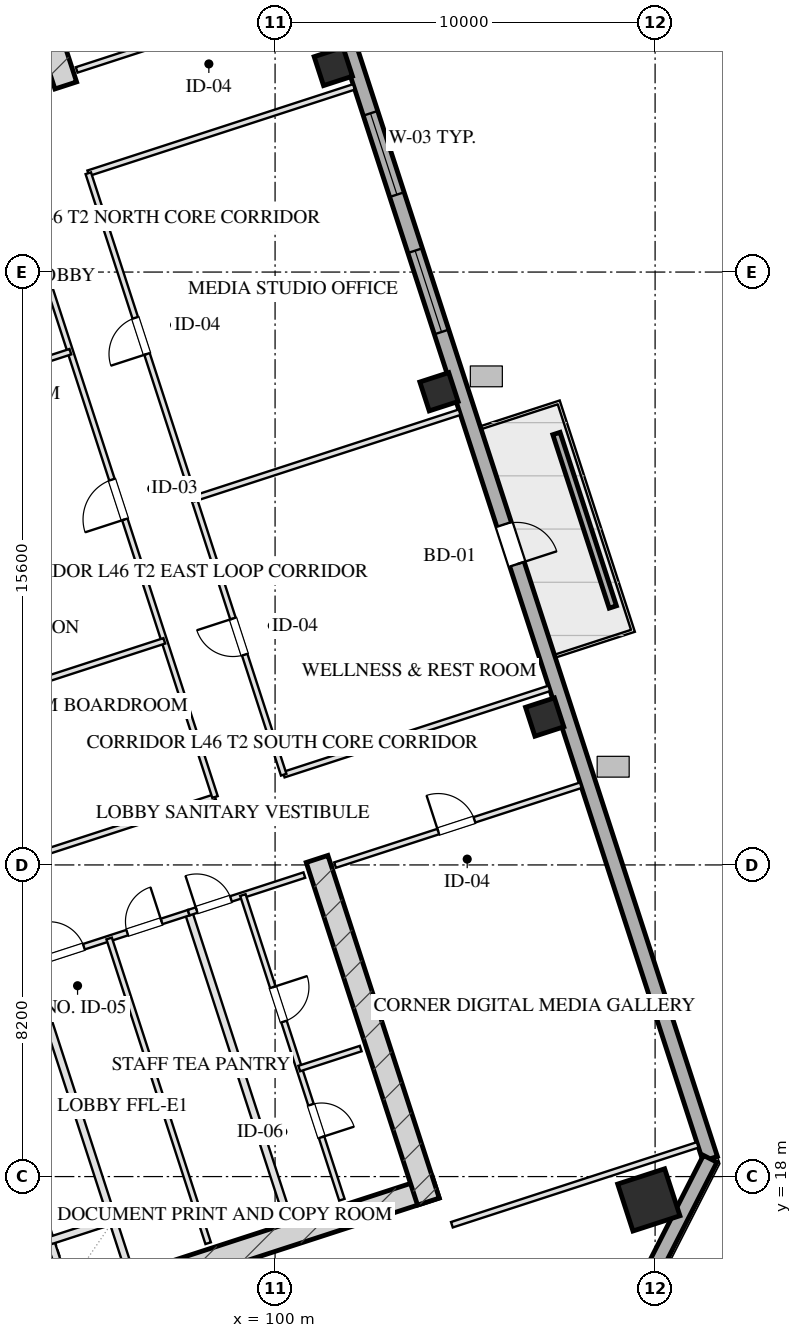
"""IFC4 building model, lengths in metres.
Left out: names, types, materials, properties, quantities, classifications, styles, units other than length and angle.
Written with IfcOpenShell. Run it as: python <this file> out.ifc"""

import sys

from ifc_helpers import new_model, si_unit, direction, frame, frame_2d, origin, origin_2d, place, context, subcontext, project, spatial, rectangle, hollow_rectangle, extrude, element, fill, save


model = new_model("IFC4")
c1 = context("Model", 3, precision=1e-05, world=origin(), true_north=direction((0.0, 1.0)))
c2 = subcontext(c1, "Body", "Model", "MODEL_VIEW")
j1 = project(units=[si_unit("LENGTHUNIT", "METRE"), si_unit("PLANEANGLEUNIT", "RADIAN")], contexts=[c1])
p1 = place(None, origin())
s1 = spatial("IfcSite", under=j1, at=p1, CompositionType="ELEMENT")
p2 = place(p1, origin())
s2 = spatial("IfcBuilding", under=s1, at=p2, CompositionType="ELEMENT")
p3 = place(p2, frame((0.0, 0.0, 173.65)))
s3 = spatial("IfcBuildingStorey", under=s2, at=p3, CompositionType="ELEMENT", Elevation=173.65)
p4 = place(p3, frame((88.63, 12.652, 0.0), z_axis=(0.0, 0.0, 1.0), x_axis=(0.95105714907, 0.309015046886, 0.0)))
e1 = element("IfcWall", 1, at=p4, inside=s3, PredefinedType="SHEAR", context=c2, shape_type="SweptSolid", body=[
    extrude(rectangle(XDim=16.4, YDim=0.6, at=frame_2d((8.2, 0.0))), origin(), (0.0, 0.0, 1.0), 3.45),
])
for number, where, z_axis, x_axis in (
    (2, (101.105, 26.358, 0.0), (0.0, 0.0, 1.0), (0.309, -0.951, 0.0)),
    (3, (94.492, 46.71, 0.0), (0.0, 0.0, 1.0), (-0.309, 0.951, 0.0)),
):
    element("IfcWall", number, at=place(p3, frame(where, z_axis=z_axis, x_axis=x_axis)), inside=s3, PredefinedType="SHEAR", context=c2, shape_type="SweptSolid", body=[
        extrude(rectangle(XDim=9.48, YDim=0.6, at=frame_2d((4.74, 0.0))), origin(), (0.0, 0.0, 1.0), 3.45),
    ])
p5 = place(p3, frame((109.835, 17.386, 0.0), z_axis=(0.0, 0.0, 1.0), x_axis=(0.951056516295, 0.309016994375, 0.0)))
e4 = element("IfcColumn", 4, at=p5, inside=s3, PredefinedType="COLUMN", context=c2, shape_type="SweptSolid", body=[
    extrude(hollow_rectangle(XDim=1.3, YDim=1.3, WallThickness=0.045, at=origin_2d()), origin(), (0.0, 0.0, 1.0), 3.451),
])
for number, where, z_axis, x_axis in (
    (5, (107.094, 30.091, 0.0), (0.0, 0.0, 1.0), (0.951, 0.309, 0.0)),
    (6, (104.313, 38.651, 0.0), (0.0, 0.0, 1.0), (0.951, 0.309, 0.0)),
    (7, (101.532, 47.21, 0.0), (0.0, 0.0, 1.0), (0.951, 0.309, 0.0)),
):
    element("IfcColumn", number, at=place(p3, frame(where, z_axis=z_axis, x_axis=x_axis)), inside=s3, PredefinedType="COLUMN", context=c2, shape_type="SweptSolid", body=[
        extrude(hollow_rectangle(XDim=0.8, YDim=0.8, WallThickness=0.028, at=origin_2d()), origin(), (0.0, 0.0, 1.0), 3.451),
    ])
p6 = place(p3, frame((98.224, 59.173, 0.0), z_axis=(0.0, 0.0, 1.0), x_axis=(0.309014228706, -0.951057414911, 0.0)))
e8 = element("IfcWall", 8, at=p6, inside=s3, PredefinedType="SOLIDWALL", context=c2, shape_type="SweptSolid", body=[
    extrude(rectangle(XDim=42.8, YDim=0.4, at=frame_2d((21.4, 0.0))), origin(), (0.0, 0.0, 1.0), 2.61),
])
p7 = place(p6, frame((17.675, 0.0, 0.75)))
e9 = element("IfcOpeningElement", 9, at=p7, cuts=e8, PredefinedType="OPENING", context=c2, shape_type="SweptSolid", body=[
    extrude(rectangle(XDim=2.25, YDim=1.46, at=frame_2d((1.125, 0.73))), frame((0.0, 0.21, 0.0), z_axis=(0.0, -1.0, 0.0), x_axis=(1.0, 0.0, 0.0)), (0.0, 0.0, 1.0), 0.42),
])
p8 = place(p6, frame((13.875, 0.0, 0.75)))
e10 = element("IfcOpeningElement", 10, at=p8, cuts=e8, PredefinedType="OPENING", context=c2, shape_type="SweptSolid", body=[
    extrude(rectangle(XDim=2.25, YDim=1.46, at=frame_2d((1.125, 0.73))), frame((0.0, 0.21, 0.0), z_axis=(0.0, -1.0, 0.0), x_axis=(1.0, 0.0, 0.0)), (0.0, 0.0, 1.0), 0.42),
])
p9 = place(p6, frame((25.25, 0.0, 0.0)))
e11 = element("IfcOpeningElement", 11, at=p9, cuts=e8, PredefinedType="OPENING", context=c2, shape_type="SweptSolid", body=[
    extrude(rectangle(XDim=1.1, YDim=2.15, at=frame_2d((0.55, 1.075))), frame((0.0, 0.21, 0.0), z_axis=(0.0, -1.0, 0.0), x_axis=(1.0, 0.0, 0.0)), (0.0, 0.0, 1.0), 0.42),
])
p10 = place(p3, frame((111.449, 18.468, 0.0), z_axis=(0.0, 0.0, 1.0), x_axis=(-0.454019523198, -0.890991735402, 0.0)))
e12 = element("IfcWall", 12, at=p10, inside=s3, PredefinedType="SOLIDWALL", context=c2, shape_type="SweptSolid", body=[
    extrude(rectangle(XDim=3.394, YDim=0.4, at=frame_2d((1.697, 0.0))), origin(), (0.0, 0.0, 1.0), 2.61),
])
p11 = place(p3, frame((108.887, 32.987, 0.0), z_axis=(0.0, 0.0, 1.0), x_axis=(-0.30900096172, 0.951061725471, 0.0)))
e13 = element("IfcWall", 13, at=p11, inside=s3, PredefinedType="PARAPET", context=c2, shape_type="SweptSolid", body=[
    extrude(rectangle(XDim=4.8, YDim=0.2, at=frame_2d((2.4, 0.0))), origin(), (0.0, 0.0, 1.0), 0.75),
])
p12 = place(p3, frame((93.542, 23.585, 0.0), z_axis=(0.0, 0.0, 1.0), x_axis=(0.309042196757, -0.951048327176, 0.0)))
e14 = element("IfcWall", 14, at=p12, inside=s3, PredefinedType="PARTITIONING", context=c2, shape_type="SweptSolid", body=[
    extrude(rectangle(XDim=8.43, YDim=0.2, at=frame_2d((4.215, 0.0))), origin(), (0.0, 0.0, 1.0), 3.175),
])
p13 = place(p3, frame((93.457, 18.247, 0.0), z_axis=(0.0, 0.0, 1.0), x_axis=(0.3089935693, -0.951064127245, 0.0)))
e15 = element("IfcWall", 15, at=p13, inside=s3, PredefinedType="PARTITIONING", context=c2, shape_type="SweptSolid", body=[
    extrude(rectangle(XDim=3.7, YDim=0.2, at=frame_2d((1.85, 0.0))), origin(), (0.0, 0.0, 1.0), 3.175),
])
p14 = place(p3, frame((94.084, 16.317, 0.0), z_axis=(0.0, 0.0, 1.0), x_axis=(0.951041328149, 0.309063734775, 0.0)))
e16 = element("IfcWall", 16, at=p14, inside=s3, PredefinedType="PARTITIONING", context=c2, shape_type="SweptSolid", body=[
    extrude(rectangle(XDim=1.73, YDim=0.2, at=frame_2d((0.865, 0.0))), origin(), (0.0, 0.0, 1.0), 3.175),
])
p15 = place(p3, frame((97.727, 24.944, 0.0), z_axis=(0.0, 0.0, 1.0), x_axis=(0.309016001439, -0.951056838919, 0.0)))
e17 = element("IfcWall", 17, at=p15, inside=s3, PredefinedType="PARTITIONING", context=c2, shape_type="SweptSolid", body=[
    extrude(rectangle(XDim=8.43, YDim=0.2, at=frame_2d((4.215, 0.0))), origin(), (0.0, 0.0, 1.0), 3.175),
])
p16 = place(p3, frame((93.542, 23.585, 0.0), z_axis=(0.0, 0.0, 1.0), x_axis=(0.951063829732, 0.308994485023, 0.0)))
e18 = element("IfcWall", 18, at=p16, inside=s3, PredefinedType="PARTITIONING", context=c2, shape_type="SweptSolid", body=[
    extrude(rectangle(XDim=4.4, YDim=0.15, at=frame_2d((2.2, 0.0))), origin(), (0.0, 0.0, 1.0), 3.175),
])
p17 = place(p16, frame((0.55, 0.0, 0.0)))
e19 = element("IfcOpeningElement", 19, at=p17, cuts=e18, PredefinedType="OPENING", context=c2, shape_type="SweptSolid", body=[
    extrude(rectangle(XDim=0.95, YDim=2.05, at=frame_2d((0.475, 1.025))), frame((0.0, 0.085, 0.0), z_axis=(0.0, -1.0, 0.0), x_axis=(1.0, 0.0, 0.0)), (0.0, 0.0, 1.0), 0.17),
])
p18 = place(p16, frame((2.7, 0.0, 0.0)))
e20 = element("IfcOpeningElement", 20, at=p18, cuts=e18, PredefinedType="OPENING", context=c2, shape_type="SweptSolid", body=[
    extrude(rectangle(XDim=0.95, YDim=2.05, at=frame_2d((0.475, 1.025))), frame((0.0, 0.085, 0.0), z_axis=(0.0, -1.0, 0.0), x_axis=(1.0, 0.0, 0.0)), (0.0, 0.0, 1.0), 0.17),
])
p19 = place(p3, frame((95.634, 24.265, 0.0), z_axis=(0.0, 0.0, 1.0), x_axis=(0.309007490203, -0.951059604335, 0.0)))
e21 = element("IfcWall", 21, at=p19, inside=s3, PredefinedType="PARTITIONING", context=c2, shape_type="SweptSolid", body=[
    extrude(rectangle(XDim=8.43, YDim=0.15, at=frame_2d((4.215, 0.0))), origin(), (0.0, 0.0, 1.0), 3.175),
])
p20 = place(p3, frame((97.727, 24.944, 0.0), z_axis=(0.0, 0.0, 1.0), x_axis=(0.951036872128, 0.309077446369, 0.0)))
e22 = element("IfcWall", 22, at=p20, inside=s3, PredefinedType="PARTITIONING", context=c2, shape_type="SweptSolid", body=[
    extrude(rectangle(XDim=3.2, YDim=0.15, at=frame_2d((1.6, 0.0))), origin(), (0.0, 0.0, 1.0), 3.175),
])
p21 = place(p20, frame((0.22, 0.0, 0.0)))
e23 = element("IfcOpeningElement", 23, at=p21, cuts=e22, PredefinedType="OPENING", context=c2, shape_type="SweptSolid", body=[
    extrude(rectangle(XDim=0.95, YDim=2.05, at=frame_2d((0.475, 1.025))), frame((0.0, 0.085, 0.0), z_axis=(0.0, -1.0, 0.0), x_axis=(1.0, 0.0, 0.0)), (0.0, 0.0, 1.0), 0.17),
])
p22 = place(p3, frame((99.153, 25.408, 0.0), z_axis=(0.0, 0.0, 1.0), x_axis=(0.309016001439, -0.951056838919, 0.0)))
e24 = element("IfcWall", 24, at=p22, inside=s3, PredefinedType="PARTITIONING", context=c2, shape_type="SweptSolid", body=[
    extrude(rectangle(XDim=8.43, YDim=0.15, at=frame_2d((4.215, 0.0))), origin(), (0.0, 0.0, 1.0), 3.175),
])
p23 = place(p22, frame((2.55, 0.0, 0.0)))
e25 = element("IfcOpeningElement", 25, at=p23, cuts=e24, PredefinedType="OPENING", context=c2, shape_type="SweptSolid", body=[
    extrude(rectangle(XDim=0.95, YDim=2.05, at=frame_2d((0.475, 1.025))), frame((0.0, 0.085, 0.0), z_axis=(0.0, -1.0, 0.0), x_axis=(1.0, 0.0, 0.0)), (0.0, 0.0, 1.0), 0.17),
])
p24 = place(p22, frame((5.8, 0.0, 0.0)))
e26 = element("IfcOpeningElement", 26, at=p24, cuts=e24, PredefinedType="OPENING", context=c2, shape_type="SweptSolid", body=[
    extrude(rectangle(XDim=0.9, YDim=2.05, at=frame_2d((0.45, 1.025))), frame((0.0, 0.085, 0.0), z_axis=(0.0, -1.0, 0.0), x_axis=(1.0, 0.0, 0.0)), (0.0, 0.0, 1.0), 0.17),
])
p25 = place(p3, frame((100.636, 20.843, 0.0), z_axis=(0.0, 0.0, 1.0), x_axis=(0.951040401051, 0.309066587596, 0.0)))
e27 = element("IfcWall", 27, at=p25, inside=s3, PredefinedType="PARTITIONING", context=c2, shape_type="SweptSolid", body=[
    extrude(rectangle(XDim=1.7, YDim=0.15, at=frame_2d((0.85, 0.0))), origin(), (0.0, 0.0, 1.0), 3.175),
])
p26 = place(p3, frame((104.653, 16.733, 0.0), z_axis=(0.0, 0.0, 1.0), x_axis=(0.951054383043, 0.309023559774, 0.0)))
e28 = element("IfcWall", 28, at=p26, inside=s3, PredefinedType="PARTITIONING", context=c2, shape_type="SweptSolid", body=[
    extrude(rectangle(XDim=6.8, YDim=0.15, at=frame_2d((3.4, 0.0))), origin(), (0.0, 0.0, 1.0), 3.175),
])
p27 = place(p3, frame((101.578, 26.196, 0.0), z_axis=(0.0, 0.0, 1.0), x_axis=(0.951064934653, 0.308991084134, 0.0)))
e29 = element("IfcWall", 29, at=p27, inside=s3, PredefinedType="PARTITIONING", context=c2, shape_type="SweptSolid", body=[
    extrude(rectangle(XDim=6.8, YDim=0.15, at=frame_2d((3.4, 0.0))), origin(), (0.0, 0.0, 1.0), 3.175),
])
p28 = place(p27, frame((2.856, 0.0, 0.0)))
e30 = element("IfcOpeningElement", 30, at=p28, cuts=e29, PredefinedType="OPENING", context=c2, shape_type="SweptSolid", body=[
    extrude(rectangle(XDim=1.0, YDim=2.05, at=frame_2d((0.5, 1.025))), frame((0.0, 0.085, 0.0), z_axis=(0.0, -1.0, 0.0), x_axis=(1.0, 0.0, 0.0)), (0.0, 0.0, 1.0), 0.17),
])
p29 = place(p3, frame((94.78, 47.119, 0.0), z_axis=(0.0, 0.0, 1.0), x_axis=(0.951057811516, 0.309013008068, 0.0)))
e31 = element("IfcWall", 31, at=p29, inside=s3, PredefinedType="PARTITIONING", context=c2, shape_type="SweptSolid", body=[
    extrude(rectangle(XDim=6.8, YDim=0.15, at=frame_2d((3.4, 0.0))), origin(), (0.0, 0.0, 1.0), 3.175),
])
p30 = place(p29, frame((2.856, 0.0, 0.0)))
e32 = element("IfcOpeningElement", 32, at=p30, cuts=e31, PredefinedType="OPENING", context=c2, shape_type="SweptSolid", body=[
    extrude(rectangle(XDim=1.0, YDim=2.05, at=frame_2d((0.5, 1.025))), frame((0.0, 0.085, 0.0), z_axis=(0.0, -1.0, 0.0), x_axis=(1.0, 0.0, 0.0)), (0.0, 0.0, 1.0), 0.17),
])
p31 = place(p3, frame((90.669, 25.469, 0.0), z_axis=(0.0, 0.0, 1.0), x_axis=(0.95106136293, 0.309002077568, 0.0)))
e33 = element("IfcWall", 33, at=p31, inside=s3, PredefinedType="PARTITIONING", context=c2, shape_type="SweptSolid", body=[
    extrude(rectangle(XDim=8.15, YDim=0.15, at=frame_2d((4.075, 0.0))), origin(), (0.0, 0.0, 1.0), 3.175),
])
p32 = place(p3, frame((100.227, 28.575, 0.0), z_axis=(0.0, 0.0, 1.0), x_axis=(0.95104773735, 0.309044011885, 0.0)))
e34 = element("IfcWall", 34, at=p32, inside=s3, PredefinedType="PARTITIONING", context=c2, shape_type="SweptSolid", body=[
    extrude(rectangle(XDim=7.35, YDim=0.15, at=frame_2d((3.675, 0.0))), origin(), (0.0, 0.0, 1.0), 3.175),
])
p33 = place(p3, frame((95.085, 44.4, 0.0), z_axis=(0.0, 0.0, 1.0), x_axis=(0.95105749975, 0.309013967595, 0.0)))
e35 = element("IfcWall", 35, at=p33, inside=s3, PredefinedType="PARTITIONING", context=c2, shape_type="SweptSolid", body=[
    extrude(rectangle(XDim=7.35, YDim=0.15, at=frame_2d((3.675, 0.0))), origin(), (0.0, 0.0, 1.0), 3.175),
])
p34 = place(p3, frame((98.42, 27.988, 0.0), z_axis=(0.0, 0.0, 1.0), x_axis=(-0.309004459387, 0.951060589068, 0.0)))
e36 = element("IfcWall", 36, at=p34, inside=s3, PredefinedType="PARTITIONING", context=c2, shape_type="SweptSolid", body=[
    extrude(rectangle(XDim=16.64, YDim=0.15, at=frame_2d((8.32, 0.0))), origin(), (0.0, 0.0, 1.0), 3.175),
])
p35 = place(p34, frame((7.68, 0.0, 0.0)))
e37 = element("IfcOpeningElement", 37, at=p35, cuts=e36, PredefinedType="OPENING", context=c2, shape_type="SweptSolid", body=[
    extrude(rectangle(XDim=1.1, YDim=2.05, at=frame_2d((0.55, 1.025))), frame((0.0, 0.085, 0.0), z_axis=(0.0, -1.0, 0.0), x_axis=(1.0, 0.0, 0.0)), (0.0, 0.0, 1.0), 0.17),
])
p36 = place(p3, frame((100.227, 28.575, 0.0), z_axis=(0.0, 0.0, 1.0), x_axis=(-0.30901773025, 0.951056277195, 0.0)))
e38 = element("IfcWall", 38, at=p36, inside=s3, PredefinedType="PARTITIONING", context=c2, shape_type="SweptSolid", body=[
    extrude(rectangle(XDim=16.64, YDim=0.15, at=frame_2d((8.32, 0.0))), origin(), (0.0, 0.0, 1.0), 3.175),
])
p37 = place(p36, frame((3.32, 0.0, 0.0)))
e39 = element("IfcOpeningElement", 39, at=p37, cuts=e38, PredefinedType="OPENING", context=c2, shape_type="SweptSolid", body=[
    extrude(rectangle(XDim=1.0, YDim=2.05, at=frame_2d((0.5, 1.025))), frame((0.0, 0.085, 0.0), z_axis=(0.0, -1.0, 0.0), x_axis=(1.0, 0.0, 0.0)), (0.0, 0.0, 1.0), 0.17),
])
p38 = place(p36, frame((11.64, 0.0, 0.0)))
e40 = element("IfcOpeningElement", 40, at=p38, cuts=e38, PredefinedType="OPENING", context=c2, shape_type="SweptSolid", body=[
    extrude(rectangle(XDim=1.0, YDim=2.05, at=frame_2d((0.5, 1.025))), frame((0.0, 0.085, 0.0), z_axis=(0.0, -1.0, 0.0), x_axis=(1.0, 0.0, 0.0)), (0.0, 0.0, 1.0), 0.17),
])
p39 = place(p3, frame((89.334, 29.578, 0.0), z_axis=(0.0, 0.0, 1.0), x_axis=(0.951052558989, 0.309029173445, 0.0)))
e41 = element("IfcWall", 41, at=p39, inside=s3, PredefinedType="PARTITIONING", context=c2, shape_type="SweptSolid", body=[
    extrude(rectangle(XDim=8.15, YDim=0.15, at=frame_2d((4.075, 0.0))), origin(), (0.0, 0.0, 1.0), 3.175),
])
p40 = place(p3, frame((86.862, 37.186, 0.0), z_axis=(0.0, 0.0, 1.0), x_axis=(0.95106422313, 0.308993274169, 0.0)))
e42 = element("IfcWall", 42, at=p40, inside=s3, PredefinedType="PARTITIONING", context=c2, shape_type="SweptSolid", body=[
    extrude(rectangle(XDim=8.15, YDim=0.15, at=frame_2d((4.075, 0.0))), origin(), (0.0, 0.0, 1.0), 3.175),
])
p41 = place(p3, frame((97.866, 35.841, 0.0), z_axis=(0.0, 0.0, 1.0), x_axis=(0.95105749975, 0.309013967595, 0.0)))
e43 = element("IfcWall", 43, at=p41, inside=s3, PredefinedType="PARTITIONING", context=c2, shape_type="SweptSolid", body=[
    extrude(rectangle(XDim=7.35, YDim=0.15, at=frame_2d((3.675, 0.0))), origin(), (0.0, 0.0, 1.0), 3.175),
])
p42 = place(p7, origin())
e44 = element("IfcWindow", 44, at=p42, inside=s3, PartitioningType="TRIPLE_PANEL_VERTICAL", PredefinedType="WINDOW", context=c2, shape_type="SweptSolid", body=[
    extrude(rectangle(XDim=2.25, YDim=1.46, at=frame_2d((1.125, 0.73))), frame((0.0, 0.03, 0.0), z_axis=(0.0, -1.0, 0.0), x_axis=(1.0, 0.0, 0.0)), (0.0, 0.0, 1.0), 0.06),
])
fill(e9, e44)
p43 = place(p8, origin())
e45 = element("IfcWindow", 45, at=p43, inside=s3, PartitioningType="TRIPLE_PANEL_VERTICAL", PredefinedType="WINDOW", context=c2, shape_type="SweptSolid", body=[
    extrude(rectangle(XDim=2.25, YDim=1.46, at=frame_2d((1.125, 0.73))), frame((0.0, 0.03, 0.0), z_axis=(0.0, -1.0, 0.0), x_axis=(1.0, 0.0, 0.0)), (0.0, 0.0, 1.0), 0.06),
])
fill(e10, e45)
p44 = place(p9, origin())
e46 = element("IfcDoor", 46, at=p44, inside=s3, OperationType="SINGLE_SWING_RIGHT", PredefinedType="DOOR", context=c2, shape_type="SweptSolid", body=[
    extrude(rectangle(XDim=1.1, YDim=2.15, at=frame_2d((0.55, 1.075))), frame((0.0, 0.025, 0.0), z_axis=(0.0, -1.0, 0.0), x_axis=(1.0, 0.0, 0.0)), (0.0, 0.0, 1.0), 0.05),
])
fill(e11, e46)
p45 = place(p17, origin())
e47 = element("IfcDoor", 47, at=p45, inside=s3, OperationType="SINGLE_SWING_LEFT", PredefinedType="DOOR", context=c2, shape_type="SweptSolid", body=[
    extrude(rectangle(XDim=0.95, YDim=2.05, at=frame_2d((0.475, 1.025))), frame((0.0, 0.025, 0.0), z_axis=(0.0, -1.0, 0.0), x_axis=(1.0, 0.0, 0.0)), (0.0, 0.0, 1.0), 0.05),
])
fill(e19, e47)
p46 = place(p18, origin())
e48 = element("IfcDoor", 48, at=p46, inside=s3, OperationType="SINGLE_SWING_RIGHT", PredefinedType="DOOR", context=c2, shape_type="SweptSolid", body=[
    extrude(rectangle(XDim=0.95, YDim=2.05, at=frame_2d((0.475, 1.025))), frame((0.0, 0.025, 0.0), z_axis=(0.0, -1.0, 0.0), x_axis=(1.0, 0.0, 0.0)), (0.0, 0.0, 1.0), 0.05),
])
fill(e20, e48)
p47 = place(p21, origin())
e49 = element("IfcDoor", 49, at=p47, inside=s3, OperationType="SINGLE_SWING_LEFT", PredefinedType="DOOR", context=c2, shape_type="SweptSolid", body=[
    extrude(rectangle(XDim=0.95, YDim=2.05, at=frame_2d((0.475, 1.025))), frame((0.0, 0.025, 0.0), z_axis=(0.0, -1.0, 0.0), x_axis=(1.0, 0.0, 0.0)), (0.0, 0.0, 1.0), 0.05),
])
fill(e23, e49)
p48 = place(p23, origin())
e50 = element("IfcDoor", 50, at=p48, inside=s3, OperationType="SINGLE_SWING_LEFT", PredefinedType="DOOR", context=c2, shape_type="SweptSolid", body=[
    extrude(rectangle(XDim=0.95, YDim=2.05, at=frame_2d((0.475, 1.025))), frame((0.0, 0.025, 0.0), z_axis=(0.0, -1.0, 0.0), x_axis=(1.0, 0.0, 0.0)), (0.0, 0.0, 1.0), 0.05),
])
fill(e25, e50)
p49 = place(p24, origin())
e51 = element("IfcDoor", 51, at=p49, inside=s3, OperationType="SINGLE_SWING_RIGHT", PredefinedType="DOOR", context=c2, shape_type="SweptSolid", body=[
    extrude(rectangle(XDim=0.9, YDim=2.05, at=frame_2d((0.45, 1.025))), frame((0.0, 0.025, 0.0), z_axis=(0.0, -1.0, 0.0), x_axis=(1.0, 0.0, 0.0)), (0.0, 0.0, 1.0), 0.05),
])
fill(e26, e51)
p50 = place(p28, origin())
e52 = element("IfcDoor", 52, at=p50, inside=s3, OperationType="SINGLE_SWING_LEFT", PredefinedType="DOOR", context=c2, shape_type="SweptSolid", body=[
    extrude(rectangle(XDim=1.0, YDim=2.05, at=frame_2d((0.5, 1.025))), frame((0.0, 0.025, 0.0), z_axis=(0.0, -1.0, 0.0), x_axis=(1.0, 0.0, 0.0)), (0.0, 0.0, 1.0), 0.05),
])
fill(e30, e52)
p51 = place(p35, origin())
e53 = element("IfcDoor", 53, at=p51, inside=s3, OperationType="SINGLE_SWING_LEFT", PredefinedType="DOOR", context=c2, shape_type="SweptSolid", body=[
    extrude(rectangle(XDim=1.1, YDim=2.05, at=frame_2d((0.55, 1.025))), frame((0.0, 0.025, 0.0), z_axis=(0.0, -1.0, 0.0), x_axis=(1.0, 0.0, 0.0)), (0.0, 0.0, 1.0), 0.05),
])
fill(e37, e53)
p52 = place(p37, origin())
e54 = element("IfcDoor", 54, at=p52, inside=s3, OperationType="SINGLE_SWING_RIGHT", PredefinedType="DOOR", context=c2, shape_type="SweptSolid", body=[
    extrude(rectangle(XDim=1.0, YDim=2.05, at=frame_2d((0.5, 1.025))), frame((0.0, 0.025, 0.0), z_axis=(0.0, -1.0, 0.0), x_axis=(1.0, 0.0, 0.0)), (0.0, 0.0, 1.0), 0.05),
])
fill(e39, e54)
p53 = place(p38, origin())
e55 = element("IfcDoor", 55, at=p53, inside=s3, OperationType="SINGLE_SWING_LEFT", PredefinedType="DOOR", context=c2, shape_type="SweptSolid", body=[
    extrude(rectangle(XDim=1.0, YDim=2.05, at=frame_2d((0.5, 1.025))), frame((0.0, 0.025, 0.0), z_axis=(0.0, -1.0, 0.0), x_axis=(1.0, 0.0, 0.0)), (0.0, 0.0, 1.0), 0.05),
])
fill(e40, e55)
save(model, sys.argv[1])
